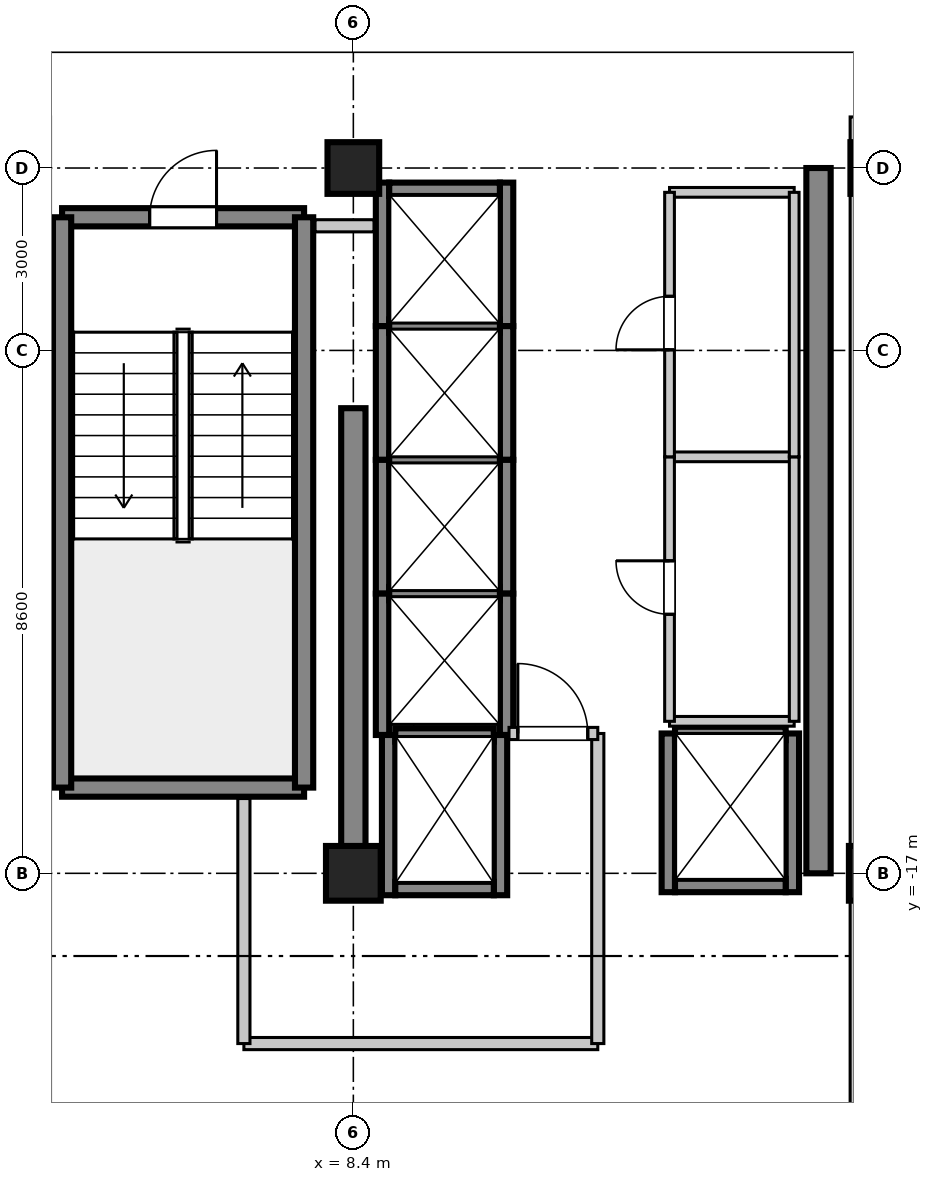
"""IFC4 building model, lengths in metres.
Left out: names, types, materials, properties, quantities, classifications, styles, units other than length and angle.
Written with IfcOpenShell. Run it as: python <this file> out.ifc"""

import sys

from ifc_helpers import new_model, si_unit, direction, frame, frame_2d, origin, origin_2d, place, context, subcontext, project, spatial, rectangle, extrude, source, transform, mapped, element, fill, save


model = new_model("IFC4")
c1 = context("Model", 3, precision=1e-05, world=origin(), true_north=direction((0.0, 1.0)))
c2 = subcontext(c1, "Body", "Model", "MODEL_VIEW")
j1 = project(units=[si_unit("LENGTHUNIT", "METRE"), si_unit("PLANEANGLEUNIT", "RADIAN")], contexts=[c1])
p1 = place(None, origin())
s1 = spatial("IfcSite", under=j1, at=p1, CompositionType="ELEMENT")
p2 = place(p1, origin())
s2 = spatial("IfcBuilding", under=s1, at=p2, CompositionType="ELEMENT")
p3 = place(p2, frame((0.0, 0.0, 300.35)))
s3 = spatial("IfcBuildingStorey", under=s2, at=p3, CompositionType="ELEMENT", Elevation=300.35)
m1 = source(origin(), c2, "Body", "SweptSolid", [
    extrude(rectangle(XDim=0.9, YDim=0.9, at=origin_2d()), origin(), (0.0, 0.0, 1.0), 3.805),
])
p4 = place(p3, frame((8.4, -17.0, 0.0), z_axis=(0.0, 0.0, 1.0), x_axis=(1.0, 0.0, 0.0)))
e1 = element("IfcColumn", 1, at=p4, inside=s3, PredefinedType="COLUMN", context=c2, shape_type="MappedRepresentation", body=[
    mapped(m1, transform((0.0, 0.0, 0.0), scale=1.0)),
])
m2 = source(origin(), c2, "Body", "SweptSolid", [
    extrude(rectangle(XDim=0.85, YDim=0.85, at=origin_2d()), origin(), (0.0, 0.0, 1.0), 3.805),
])
p5 = place(p3, frame((8.4, -5.4, 0.0), z_axis=(0.0, 0.0, 1.0), x_axis=(1.0, 0.0, 0.0)))
e2 = element("IfcColumn", 2, at=p5, inside=s3, PredefinedType="PILASTER", context=c2, shape_type="MappedRepresentation", body=[
    mapped(m2, transform((0.0, 0.0, 0.0), scale=1.0)),
])
p6 = place(p3, frame((17.0, -17.0, 0.0), z_axis=(0.0, 0.0, 1.0), x_axis=(1.0, 0.0, 0.0)))
e3 = element("IfcColumn", 3, at=p6, inside=s3, PredefinedType="COLUMN", context=c2, shape_type="MappedRepresentation", body=[
    mapped(m1, transform((0.0, 0.0, 0.0), scale=1.0)),
])
p7 = place(p3, frame((17.0, -5.4, 0.0), z_axis=(0.0, 0.0, 1.0), x_axis=(1.0, 0.0, 0.0)))
e4 = element("IfcColumn", 4, at=p7, inside=s3, PredefinedType="PILASTER", context=c2, shape_type="MappedRepresentation", body=[
    mapped(m2, transform((0.0, 0.0, 0.0), scale=1.0)),
])
m3 = source(origin(), c2, "Body", "SweptSolid", [
    extrude(rectangle(XDim=7.65, YDim=0.4, at=frame_2d((3.825, 0.0))), origin(), (0.0, 0.0, 1.0), 3.55),
])
p8 = place(p3, frame((8.4, -17.0, 0.0), z_axis=(0.0, 0.0, 1.0), x_axis=(0.0, 1.0, 0.0)))
e5 = element("IfcWall", 5, at=p8, inside=s3, PredefinedType="SHEAR", context=c2, shape_type="MappedRepresentation", body=[
    mapped(m3, transform((0.0, 0.0, 0.0), scale=1.0)),
])
m4 = source(origin(), c2, "Body", "SweptSolid", [
    extrude(rectangle(XDim=11.6, YDim=0.4, at=frame_2d((5.8, 0.0))), origin(), (0.0, 0.0, 1.0), 3.55),
])
p9 = place(p3, frame((16.05, -17.0, 0.0), z_axis=(0.0, 0.0, 1.0), x_axis=(0.0, 1.0, 0.0)))
e6 = element("IfcWall", 6, at=p9, inside=s3, PredefinedType="SHEAR", context=c2, shape_type="MappedRepresentation", body=[
    mapped(m4, transform((0.0, 0.0, 0.0), scale=1.0)),
])
m5 = source(origin(), c2, "Body", "SweptSolid", [
    extrude(rectangle(XDim=3.98, YDim=0.3, at=frame_2d((1.99, 0.0))), origin(), (0.0, 0.0, 1.0), 3.55),
])
p10 = place(p3, frame((3.61, -15.59, 0.0), z_axis=(0.0, 0.0, 1.0), x_axis=(1.0, 0.0, 0.0)))
e7 = element("IfcWall", 7, at=p10, inside=s3, PredefinedType="SHEAR", context=c2, shape_type="MappedRepresentation", body=[
    mapped(m5, transform((0.0, 0.0, 0.0), scale=1.0)),
])
p11 = place(p3, frame((3.61, -6.21, 0.0), z_axis=(0.0, 0.0, 1.0), x_axis=(1.0, 0.0, 0.0)))
e8 = element("IfcWall", 8, at=p11, inside=s3, PredefinedType="SHEAR", context=c2, shape_type="MappedRepresentation", body=[
    mapped(m5, transform((0.0, 0.0, 0.0), scale=1.0)),
])
p12 = place(p11, frame((1.44, 0.0, 0.0)))
e9 = element("IfcOpeningElement", 9, at=p12, cuts=e8, PredefinedType="OPENING", context=c2, shape_type="SweptSolid", body=[
    extrude(rectangle(XDim=1.1, YDim=2.15, at=frame_2d((0.55, 1.075))), frame((0.0, 0.16, 0.0), z_axis=(0.0, -1.0, 0.0), x_axis=(1.0, 0.0, 0.0)), (0.0, 0.0, 1.0), 0.32),
])
m6 = source(origin(), c2, "Body", "SweptSolid", [
    extrude(rectangle(XDim=9.38, YDim=0.3, at=frame_2d((4.69, 0.0))), origin(), (0.0, 0.0, 1.0), 3.55),
])
for number, where, z_axis, x_axis in (
    (10, (3.61, -15.59, 0.0), (0.0, 0.0, 1.0), (0.0, 1.0, 0.0)),
    (11, (7.59, -15.59, 0.0), (0.0, 0.0, 1.0), (0.0, 1.0, 0.0)),
):
    element("IfcWall", number, at=place(p3, frame(where, z_axis=z_axis, x_axis=x_axis)), inside=s3, PredefinedType="SHEAR", context=c2, shape_type="MappedRepresentation", body=[
        mapped(m6, transform((0.0, 0.0, 0.0), scale=1.0)),
    ])
m7 = source(origin(), c2, "Body", "SweptSolid", [
    extrude(rectangle(XDim=2.36, YDim=0.22, at=frame_2d((1.18, 0.0))), origin(), (0.0, 0.0, 1.0), 3.55),
])
for number, where, z_axis, x_axis in (
    (12, (8.88, -8.0, 0.0), (0.0, 0.0, 1.0), (0.0, 1.0, 0.0)),
    (13, (10.92, -8.0, 0.0), (0.0, 0.0, 1.0), (0.0, 1.0, 0.0)),
):
    element("IfcWall", number, at=place(p3, frame(where, z_axis=z_axis, x_axis=x_axis)), inside=s3, PredefinedType="SHEAR", context=c2, shape_type="MappedRepresentation", body=[
        mapped(m7, transform((0.0, 0.0, 0.0), scale=1.0)),
    ])
m8 = source(origin(), c2, "Body", "SweptSolid", [
    extrude(rectangle(XDim=1.82, YDim=0.22, at=frame_2d((0.91, 0.0))), origin(), (0.0, 0.0, 1.0), 3.55),
])
p13 = place(p3, frame((8.99, -5.75, 0.0), z_axis=(0.0, 0.0, 1.0), x_axis=(1.0, 0.0, 0.0)))
e14 = element("IfcWall", 14, at=p13, inside=s3, PredefinedType="SHEAR", context=c2, shape_type="MappedRepresentation", body=[
    mapped(m8, transform((0.0, 0.0, 0.0), scale=1.0)),
])
m9 = source(origin(), c2, "Body", "SweptSolid", [
    extrude(rectangle(XDim=2.2, YDim=0.22, at=frame_2d((1.1, 0.0))), origin(), (0.0, 0.0, 1.0), 3.55),
])
for number, where, z_axis, x_axis in (
    (15, (8.88, -10.2, 0.0), (0.0, 0.0, 1.0), (0.0, 1.0, 0.0)),
    (16, (10.92, -10.2, 0.0), (0.0, 0.0, 1.0), (0.0, 1.0, 0.0)),
):
    element("IfcWall", number, at=place(p3, frame(where, z_axis=z_axis, x_axis=x_axis)), inside=s3, PredefinedType="SHEAR", context=c2, shape_type="MappedRepresentation", body=[
        mapped(m9, transform((0.0, 0.0, 0.0), scale=1.0)),
    ])
m10 = source(origin(), c2, "Body", "SweptSolid", [
    extrude(rectangle(XDim=1.82, YDim=0.22, at=frame_2d((0.91, 0.0))), origin(), (0.0, 0.0, 1.0), 3.85),
])
p14 = place(p3, frame((8.99, -8.0, 0.0), z_axis=(0.0, 0.0, 1.0), x_axis=(1.0, 0.0, 0.0)))
e17 = element("IfcWall", 17, at=p14, inside=s3, PredefinedType="SHEAR", context=c2, shape_type="MappedRepresentation", body=[
    mapped(m10, transform((0.0, 0.0, 0.0), scale=1.0)),
])
for number, where, z_axis, x_axis in (
    (18, (8.88, -12.4, 0.0), (0.0, 0.0, 1.0), (0.0, 1.0, 0.0)),
    (19, (10.92, -12.4, 0.0), (0.0, 0.0, 1.0), (0.0, 1.0, 0.0)),
):
    element("IfcWall", number, at=place(p3, frame(where, z_axis=z_axis, x_axis=x_axis)), inside=s3, PredefinedType="SHEAR", context=c2, shape_type="MappedRepresentation", body=[
        mapped(m9, transform((0.0, 0.0, 0.0), scale=1.0)),
    ])
p15 = place(p3, frame((8.99, -10.2, 0.0), z_axis=(0.0, 0.0, 1.0), x_axis=(1.0, 0.0, 0.0)))
e20 = element("IfcWall", 20, at=p15, inside=s3, PredefinedType="SHEAR", context=c2, shape_type="MappedRepresentation", body=[
    mapped(m10, transform((0.0, 0.0, 0.0), scale=1.0)),
])
m11 = source(origin(), c2, "Body", "SweptSolid", [
    extrude(rectangle(XDim=2.325, YDim=0.22, at=frame_2d((1.163, 0.0))), origin(), (0.0, 0.0, 1.0), 3.55),
])
for number, where, z_axis, x_axis in (
    (21, (8.88, -14.725, 0.0), (0.0, 0.0, 1.0), (0.0, 1.0, 0.0)),
    (22, (10.92, -14.725, 0.0), (0.0, 0.0, 1.0), (0.0, 1.0, 0.0)),
):
    element("IfcWall", number, at=place(p3, frame(where, z_axis=z_axis, x_axis=x_axis)), inside=s3, PredefinedType="SHEAR", context=c2, shape_type="MappedRepresentation", body=[
        mapped(m11, transform((0.0, 0.0, 0.0), scale=1.0)),
    ])
p16 = place(p3, frame((8.99, -12.4, 0.0), z_axis=(0.0, 0.0, 1.0), x_axis=(1.0, 0.0, 0.0)))
e23 = element("IfcWall", 23, at=p16, inside=s3, PredefinedType="SHEAR", context=c2, shape_type="MappedRepresentation", body=[
    mapped(m10, transform((0.0, 0.0, 0.0), scale=1.0)),
])
m12 = source(origin(), c2, "Body", "SweptSolid", [
    extrude(rectangle(XDim=2.635, YDim=0.22, at=frame_2d((1.317, 0.0))), origin(), (0.0, 0.0, 1.0), 3.55),
])
for number, where, z_axis, x_axis in (
    (24, (8.98, -17.36, 0.0), (0.0, 0.0, 1.0), (0.0, 1.0, 0.0)),
    (25, (10.82, -17.36, 0.0), (0.0, 0.0, 1.0), (0.0, 1.0, 0.0)),
):
    element("IfcWall", number, at=place(p3, frame(where, z_axis=z_axis, x_axis=x_axis)), inside=s3, PredefinedType="SHEAR", context=c2, shape_type="MappedRepresentation", body=[
        mapped(m12, transform((0.0, 0.0, 0.0), scale=1.0)),
    ])
m13 = source(origin(), c2, "Body", "SweptSolid", [
    extrude(rectangle(XDim=1.62, YDim=0.22, at=frame_2d((0.81, 0.0))), origin(), (0.0, 0.0, 1.0), 3.55),
])
p17 = place(p3, frame((9.09, -17.25, 0.0), z_axis=(0.0, 0.0, 1.0), x_axis=(1.0, 0.0, 0.0)))
e26 = element("IfcWall", 26, at=p17, inside=s3, PredefinedType="SHEAR", context=c2, shape_type="MappedRepresentation", body=[
    mapped(m13, transform((0.0, 0.0, 0.0), scale=1.0)),
])
m14 = source(origin(), c2, "Body", "SweptSolid", [
    extrude(rectangle(XDim=1.62, YDim=0.22, at=frame_2d((0.81, 0.0))), origin(), (0.0, 0.0, 1.0), 3.85),
])
p18 = place(p3, frame((9.09, -14.725, 0.0), z_axis=(0.0, 0.0, 1.0), x_axis=(1.0, 0.0, 0.0)))
e27 = element("IfcWall", 27, at=p18, inside=s3, PredefinedType="SHEAR", context=c2, shape_type="MappedRepresentation", body=[
    mapped(m14, transform((0.0, 0.0, 0.0), scale=1.0)),
])
m15 = source(origin(), c2, "Body", "SweptSolid", [
    extrude(rectangle(XDim=2.61, YDim=0.22, at=frame_2d((1.305, 0.0))), origin(), (0.0, 0.0, 1.0), 3.55),
])
for number, where, z_axis, x_axis in (
    (28, (13.58, -17.31, 0.0), (0.0, 0.0, 1.0), (0.0, 1.0, 0.0)),
    (29, (15.62, -17.31, 0.0), (0.0, 0.0, 1.0), (0.0, 1.0, 0.0)),
):
    element("IfcWall", number, at=place(p3, frame(where, z_axis=z_axis, x_axis=x_axis)), inside=s3, PredefinedType="SHEAR", context=c2, shape_type="MappedRepresentation", body=[
        mapped(m15, transform((0.0, 0.0, 0.0), scale=1.0)),
    ])
p19 = place(p3, frame((13.69, -17.2, 0.0), z_axis=(0.0, 0.0, 1.0), x_axis=(1.0, 0.0, 0.0)))
e30 = element("IfcWall", 30, at=p19, inside=s3, PredefinedType="SHEAR", context=c2, shape_type="MappedRepresentation", body=[
    mapped(m8, transform((0.0, 0.0, 0.0), scale=1.0)),
])
p20 = place(p3, frame((13.69, -14.7, 0.0), z_axis=(0.0, 0.0, 1.0), x_axis=(1.0, 0.0, 0.0)))
e31 = element("IfcWall", 31, at=p20, inside=s3, PredefinedType="SHEAR", context=c2, shape_type="MappedRepresentation", body=[
    mapped(m10, transform((0.0, 0.0, 0.0), scale=1.0)),
])
m16 = source(origin(), c2, "Body", "SweptSolid", [
    extrude(rectangle(XDim=5.82, YDim=0.2, at=frame_2d((2.91, 0.0))), origin(), (0.0, 0.0, 1.0), 2.89),
])
p21 = place(p3, frame((6.6, -19.8, 0.0), z_axis=(0.0, 0.0, 1.0), x_axis=(1.0, 0.0, 0.0)))
e32 = element("IfcWall", 32, at=p21, inside=s3, PredefinedType="PARTITIONING", context=c2, shape_type="MappedRepresentation", body=[
    mapped(m16, transform((0.0, 0.0, 0.0), scale=1.0)),
])
m17 = source(origin(), c2, "Body", "SweptSolid", [
    extrude(rectangle(XDim=4.03, YDim=0.2, at=frame_2d((2.015, 0.0))), origin(), (0.0, 0.0, 1.0), 2.89),
])
p22 = place(p3, frame((6.6, -19.8, 0.0), z_axis=(0.0, 0.0, 1.0), x_axis=(0.0, 1.0, 0.0)))
e33 = element("IfcWall", 33, at=p22, inside=s3, PredefinedType="PARTITIONING", context=c2, shape_type="MappedRepresentation", body=[
    mapped(m17, transform((0.0, 0.0, 0.0), scale=1.0)),
])
m18 = source(origin(), c2, "Body", "SweptSolid", [
    extrude(rectangle(XDim=5.1, YDim=0.2, at=frame_2d((2.55, 0.0))), origin(), (0.0, 0.0, 1.0), 2.89),
])
p23 = place(p3, frame((12.42, -19.8, 0.0), z_axis=(0.0, 0.0, 1.0), x_axis=(0.0, 1.0, 0.0)))
e34 = element("IfcWall", 34, at=p23, inside=s3, PredefinedType="PARTITIONING", context=c2, shape_type="MappedRepresentation", body=[
    mapped(m18, transform((0.0, 0.0, 0.0), scale=1.0)),
])
m19 = source(origin(), c2, "Body", "SweptSolid", [
    extrude(rectangle(XDim=1.46, YDim=0.2, at=frame_2d((0.73, 0.0))), origin(), (0.0, 0.0, 1.0), 2.89),
])
p24 = place(p3, frame((10.96, -14.7, 0.0), z_axis=(0.0, 0.0, 1.0), x_axis=(1.0, 0.0, 0.0)))
e35 = element("IfcWall", 35, at=p24, inside=s3, PredefinedType="PARTITIONING", context=c2, shape_type="MappedRepresentation", body=[
    mapped(m19, transform((0.0, 0.0, 0.0), scale=1.0)),
])
p25 = place(p24, frame((0.145, 0.0, 0.0)))
e36 = element("IfcOpeningElement", 36, at=p25, cuts=e35, PredefinedType="OPENING", context=c2, shape_type="SweptSolid", body=[
    extrude(rectangle(XDim=1.15, YDim=2.15, at=frame_2d((0.575, 1.075))), frame((0.0, 0.11, 0.0), z_axis=(0.0, -1.0, 0.0), x_axis=(1.0, 0.0, 0.0)), (0.0, 0.0, 1.0), 0.22),
])
m20 = source(origin(), c2, "Body", "SweptSolid", [
    extrude(rectangle(XDim=0.97, YDim=0.2, at=frame_2d((0.485, 0.0))), origin(), (0.0, 0.0, 1.0), 2.89),
])
p26 = place(p3, frame((7.77, -6.35, 0.0), z_axis=(0.0, 0.0, 1.0), x_axis=(1.0, 0.0, 0.0)))
e37 = element("IfcWall", 37, at=p26, inside=s3, PredefinedType="PARTITIONING", context=c2, shape_type="MappedRepresentation", body=[
    mapped(m20, transform((0.0, 0.0, 0.0), scale=1.0)),
])
m21 = source(origin(), c2, "Body", "SweptSolid", [
    extrude(rectangle(XDim=2.05, YDim=0.16, at=frame_2d((1.025, 0.0))), origin(), (0.0, 0.0, 1.0), 2.89),
])
for number, where, z_axis, x_axis in (
    (38, (13.6, -14.5, 0.0), (0.0, 0.0, 1.0), (1.0, 0.0, 0.0)),
    (39, (13.6, -10.15, 0.0), (0.0, 0.0, 1.0), (1.0, 0.0, 0.0)),
):
    element("IfcWall", number, at=place(p3, frame(where, z_axis=z_axis, x_axis=x_axis)), inside=s3, PredefinedType="PARTITIONING", context=c2, shape_type="MappedRepresentation", body=[
        mapped(m21, transform((0.0, 0.0, 0.0), scale=1.0)),
    ])
m22 = source(origin(), c2, "Body", "SweptSolid", [
    extrude(rectangle(XDim=4.35, YDim=0.16, at=frame_2d((2.175, 0.0))), origin(), (0.0, 0.0, 1.0), 2.89),
])
p27 = place(p3, frame((13.6, -14.5, 0.0), z_axis=(0.0, 0.0, 1.0), x_axis=(0.0, 1.0, 0.0)))
e40 = element("IfcWall", 40, at=p27, inside=s3, PredefinedType="PARTITIONING", context=c2, shape_type="MappedRepresentation", body=[
    mapped(m22, transform((0.0, 0.0, 0.0), scale=1.0)),
])
p28 = place(p27, frame((1.76, 0.0, 0.0)))
e41 = element("IfcOpeningElement", 41, at=p28, cuts=e40, PredefinedType="OPENING", context=c2, shape_type="SweptSolid", body=[
    extrude(rectangle(XDim=0.88, YDim=2.1, at=frame_2d((0.44, 1.05))), frame((0.0, 0.09, 0.0), z_axis=(0.0, -1.0, 0.0), x_axis=(1.0, 0.0, 0.0)), (0.0, 0.0, 1.0), 0.18),
])
p29 = place(p3, frame((15.65, -14.5, 0.0), z_axis=(0.0, 0.0, 1.0), x_axis=(0.0, 1.0, 0.0)))
e42 = element("IfcWall", 42, at=p29, inside=s3, PredefinedType="PARTITIONING", context=c2, shape_type="MappedRepresentation", body=[
    mapped(m22, transform((0.0, 0.0, 0.0), scale=1.0)),
])
p30 = place(p3, frame((13.6, -5.8, 0.0), z_axis=(0.0, 0.0, 1.0), x_axis=(1.0, 0.0, 0.0)))
e43 = element("IfcWall", 43, at=p30, inside=s3, PredefinedType="PARTITIONING", context=c2, shape_type="MappedRepresentation", body=[
    mapped(m21, transform((0.0, 0.0, 0.0), scale=1.0)),
])
m23 = source(origin(), c2, "Body", "SweptSolid", [
    extrude(rectangle(XDim=4.35, YDim=0.16, at=frame_2d((2.175, 0.0))), origin(), (0.0, 0.0, 1.0), 2.89),
])
p31 = place(p3, frame((13.6, -10.15, 0.0), z_axis=(0.0, 0.0, 1.0), x_axis=(0.0, 1.0, 0.0)))
e44 = element("IfcWall", 44, at=p31, inside=s3, PredefinedType="PARTITIONING", context=c2, shape_type="MappedRepresentation", body=[
    mapped(m23, transform((0.0, 0.0, 0.0), scale=1.0)),
])
p32 = place(p31, frame((1.76, 0.0, 0.0)))
e45 = element("IfcOpeningElement", 45, at=p32, cuts=e44, PredefinedType="OPENING", context=c2, shape_type="SweptSolid", body=[
    extrude(rectangle(XDim=0.88, YDim=2.1, at=frame_2d((0.44, 1.05))), frame((0.0, 0.09, 0.0), z_axis=(0.0, -1.0, 0.0), x_axis=(1.0, 0.0, 0.0)), (0.0, 0.0, 1.0), 0.18),
])
p33 = place(p3, frame((15.65, -10.15, 0.0), z_axis=(0.0, 0.0, 1.0), x_axis=(0.0, 1.0, 0.0)))
e46 = element("IfcWall", 46, at=p33, inside=s3, PredefinedType="PARTITIONING", context=c2, shape_type="MappedRepresentation", body=[
    mapped(m23, transform((0.0, 0.0, 0.0), scale=1.0)),
])
m24 = source(origin(), c2, "Body", "SweptSolid", [
    extrude(rectangle(XDim=17.74, YDim=0.16, at=frame_2d((8.87, 0.0))), origin(), (0.0, 0.0, 1.0), 2.89),
])
p34 = place(p3, frame((16.65, -22.3, 0.0), z_axis=(0.0, 0.0, 1.0), x_axis=(0.0, 1.0, 0.0)))
e47 = element("IfcWall", 47, at=p34, inside=s3, PredefinedType="PARTITIONING", context=c2, shape_type="MappedRepresentation", body=[
    mapped(m24, transform((0.0, 0.0, 0.0), scale=1.0)),
])
m25 = source(origin(), c2, "Body", "SweptSolid", [
    extrude(rectangle(XDim=1.1, YDim=2.15, at=frame_2d((0.55, 1.075))), frame((0.0, 0.025, 0.0), z_axis=(0.0, -1.0, 0.0), x_axis=(1.0, 0.0, 0.0)), (0.0, 0.0, 1.0), 0.05),
])
p35 = place(p12, frame((1.1, 0.0, 0.0), z_axis=(0.0, 0.0, 1.0), x_axis=(-1.0, 0.0, 0.0)))
e48 = element("IfcDoor", 48, at=p35, inside=s3, OperationType="SINGLE_SWING_RIGHT", PredefinedType="DOOR", context=c2, shape_type="MappedRepresentation", body=[
    mapped(m25, transform((0.0, 0.0, 0.0), scale=1.0)),
])
fill(e9, e48)
m26 = source(origin(), c2, "Body", "SweptSolid", [
    extrude(rectangle(XDim=1.15, YDim=2.15, at=frame_2d((0.575, 1.075))), frame((0.0, 0.025, 0.0), z_axis=(0.0, -1.0, 0.0), x_axis=(1.0, 0.0, 0.0)), (0.0, 0.0, 1.0), 0.05),
])
p36 = place(p25, origin())
e49 = element("IfcDoor", 49, at=p36, inside=s3, OperationType="SINGLE_SWING_LEFT", PredefinedType="DOOR", context=c2, shape_type="MappedRepresentation", body=[
    mapped(m26, transform((0.0, 0.0, 0.0), scale=1.0)),
])
fill(e36, e49)
m27 = source(origin(), c2, "Body", "SweptSolid", [
    extrude(rectangle(XDim=0.88, YDim=2.1, at=frame_2d((0.44, 1.05))), frame((0.0, 0.025, 0.0), z_axis=(0.0, -1.0, 0.0), x_axis=(1.0, 0.0, 0.0)), (0.0, 0.0, 1.0), 0.05),
])
p37 = place(p28, frame((0.88, 0.0, 0.0), z_axis=(0.0, 0.0, 1.0), x_axis=(-1.0, 0.0, 0.0)))
e50 = element("IfcDoor", 50, at=p37, inside=s3, OperationType="SINGLE_SWING_RIGHT", PredefinedType="DOOR", context=c2, shape_type="MappedRepresentation", body=[
    mapped(m27, transform((0.0, 0.0, 0.0), scale=1.0)),
])
fill(e41, e50)
p38 = place(p32, frame((0.88, 0.0, 0.0), z_axis=(0.0, 0.0, 1.0), x_axis=(-1.0, 0.0, 0.0)))
e51 = element("IfcDoor", 51, at=p38, inside=s3, OperationType="SINGLE_SWING_LEFT", PredefinedType="DOOR", context=c2, shape_type="MappedRepresentation", body=[
    mapped(m27, transform((0.0, 0.0, 0.0), scale=1.0)),
])
fill(e45, e51)
save(model, sys.argv[1])
